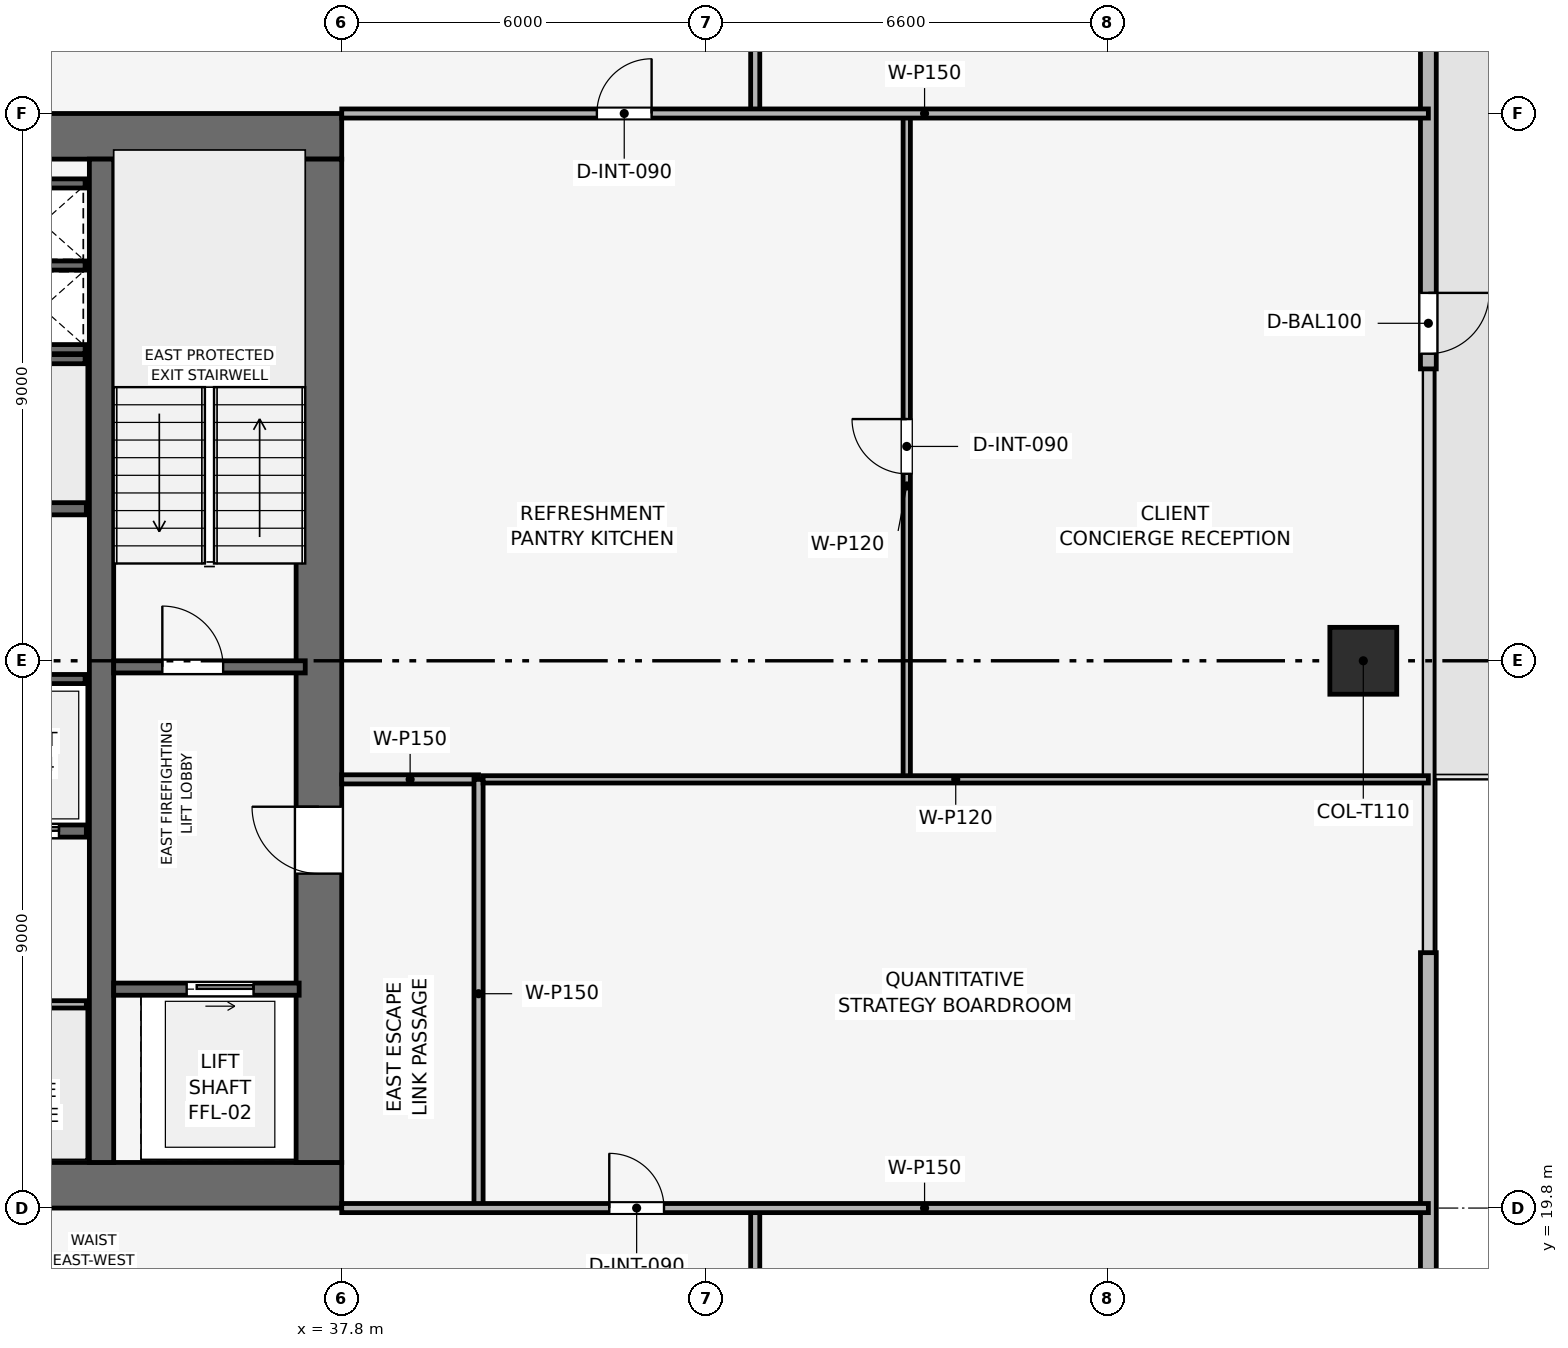
"""IFC4 building model, lengths in metres.
Left out: names, types, materials, properties, quantities, classifications, styles, units other than length and angle.
Written with IfcOpenShell. Run it as: python <this file> out.ifc"""

import sys

from ifc_helpers import new_model, si_unit, direction, frame, frame_2d, origin, origin_2d, place, context, subcontext, project, spatial, rectangle, extrude, element, fill, save


model = new_model("IFC4")
c1 = context("Model", 3, precision=1e-05, world=origin(), true_north=direction((0.0, 1.0)))
c2 = subcontext(c1, "Body", "Model", "MODEL_VIEW")
j1 = project(units=[si_unit("LENGTHUNIT", "METRE"), si_unit("PLANEANGLEUNIT", "RADIAN")], contexts=[c1])
p1 = place(None, origin())
s1 = spatial("IfcSite", under=j1, at=p1, CompositionType="ELEMENT")
p2 = place(p1, origin())
s2 = spatial("IfcBuilding", under=s1, at=p2, CompositionType="ELEMENT")
p3 = place(p2, frame((0.0, 0.0, 203.7)))
s3 = spatial("IfcBuildingStorey", under=s2, at=p3, CompositionType="ELEMENT", Elevation=203.7)
p4 = place(p3, frame((19.8, 20.175, 0.0), z_axis=(0.0, 0.0, 1.0), x_axis=(1.0, 0.0, 0.0)))
e1 = element("IfcWall", 1, at=p4, inside=s3, PredefinedType="SHEAR", context=c2, shape_type="SweptSolid", body=[
    extrude(rectangle(XDim=18.0, YDim=0.75, at=frame_2d((9.0, 0.0))), origin(), (0.0, 0.0, 1.0), 3.75),
])
p5 = place(p4, frame((8.4, 0.0, 0.0)))
e2 = element("IfcOpeningElement", 2, at=p5, cuts=e1, PredefinedType="OPENING", context=c2, shape_type="SweptSolid", body=[
    extrude(rectangle(XDim=1.2, YDim=2.2, at=frame_2d((0.6, 1.1))), frame((0.0, 0.385, 0.0), z_axis=(0.0, -1.0, 0.0), x_axis=(1.0, 0.0, 0.0)), (0.0, 0.0, 1.0), 0.77),
])
p6 = place(p3, frame((19.8, 37.425, 0.0), z_axis=(0.0, 0.0, 1.0), x_axis=(1.0, 0.0, 0.0)))
e3 = element("IfcWall", 3, at=p6, inside=s3, PredefinedType="SHEAR", context=c2, shape_type="SweptSolid", body=[
    extrude(rectangle(XDim=18.0, YDim=0.75, at=frame_2d((9.0, 0.0))), origin(), (0.0, 0.0, 1.0), 3.75),
])
p7 = place(p6, frame((7.05, 0.0, 0.0)))
e4 = element("IfcOpeningElement", 4, at=p7, cuts=e3, PredefinedType="OPENING", context=c2, shape_type="SweptSolid", body=[
    extrude(rectangle(XDim=1.1, YDim=2.15, at=frame_2d((0.55, 1.075))), frame((0.0, 0.385, 0.0), z_axis=(0.0, -1.0, 0.0), x_axis=(1.0, 0.0, 0.0)), (0.0, 0.0, 1.0), 0.77),
])
p8 = place(p3, frame((37.425, 20.55, 0.0), z_axis=(0.0, 0.0, 1.0), x_axis=(0.0, 1.0, 0.0)))
e5 = element("IfcWall", 5, at=p8, inside=s3, PredefinedType="SHEAR", context=c2, shape_type="SweptSolid", body=[
    extrude(rectangle(XDim=16.5, YDim=0.75, at=frame_2d((8.25, 0.0))), origin(), (0.0, 0.0, 1.0), 3.75),
])
p9 = place(p8, frame((4.75, 0.0, 0.0)))
e6 = element("IfcOpeningElement", 6, at=p9, cuts=e5, PredefinedType="OPENING", context=c2, shape_type="SweptSolid", body=[
    extrude(rectangle(XDim=1.1, YDim=2.15, at=frame_2d((0.55, 1.075))), frame((0.0, 0.385, 0.0), z_axis=(0.0, -1.0, 0.0), x_axis=(1.0, 0.0, 0.0)), (0.0, 0.0, 1.0), 0.77),
])
p10 = place(p3, frame((33.85, 20.55, 0.0), z_axis=(0.0, 0.0, 1.0), x_axis=(0.0, 1.0, 0.0)))
e7 = element("IfcWall", 7, at=p10, inside=s3, PredefinedType="SHEAR", context=c2, shape_type="SweptSolid", body=[
    extrude(rectangle(XDim=16.5, YDim=0.4, at=frame_2d((8.25, 0.0))), origin(), (0.0, 0.0, 1.0), 3.75),
])
p11 = place(p3, frame((54.6, 28.8, 0.003), z_axis=(0.0, 0.0, 1.0), x_axis=(1.0, 0.0, 0.0)))
e8 = element("IfcColumn", 8, at=p11, inside=s3, PredefinedType="COLUMN", context=c2, shape_type="SweptSolid", body=[
    extrude(rectangle(XDim=1.1, YDim=1.1, at=origin_2d()), origin(), (0.0, 0.0, 1.0), 3.494),
])
p12 = place(p3, frame((55.67, 48.3, 0.0), z_axis=(0.0, 0.0, 1.0), x_axis=(0.0, -1.0, 0.0)))
e9 = element("IfcWall", 9, at=p12, inside=s3, PredefinedType="SOLIDWALL", context=c2, shape_type="SweptSolid", body=[
    extrude(rectangle(XDim=14.7, YDim=0.26, at=frame_2d((7.35, 0.0))), origin(), (0.0, 0.0, 1.0), 3.5),
])
p13 = place(p12, frame((13.45, 0.0, 0.0)))
e10 = element("IfcOpeningElement", 10, at=p13, cuts=e9, PredefinedType="OPENING", context=c2, shape_type="SweptSolid", body=[
    extrude(rectangle(XDim=1.0, YDim=2.2, at=frame_2d((0.5, 1.1))), frame((0.0, 0.14, 0.0), z_axis=(0.0, -1.0, 0.0), x_axis=(1.0, 0.0, 0.0)), (0.0, 0.0, 1.0), 0.28),
])
p14 = place(p3, frame((55.67, 24.0, 0.0), z_axis=(0.0, 0.0, 1.0), x_axis=(0.0, -1.0, 0.0)))
e11 = element("IfcWall", 11, at=p14, inside=s3, PredefinedType="SOLIDWALL", context=c2, shape_type="SweptSolid", body=[
    extrude(rectangle(XDim=14.7, YDim=0.26, at=frame_2d((7.35, 0.0))), origin(), (0.0, 0.0, 1.0), 3.5),
])
p15 = place(p14, frame((10.65, 0.0, 0.9)))
e12 = element("IfcOpeningElement", 12, at=p15, cuts=e11, PredefinedType="OPENING", context=c2, shape_type="SweptSolid", body=[
    extrude(rectangle(XDim=3.8, YDim=1.9, at=frame_2d((1.9, 0.95))), frame((0.0, 0.14, 0.0), z_axis=(0.0, -1.0, 0.0), x_axis=(1.0, 0.0, 0.0)), (0.0, 0.0, 1.0), 0.28),
])
p16 = place(p3, frame((34.05, 28.7, 0.0), z_axis=(0.0, 0.0, 1.0), x_axis=(1.0, 0.0, 0.0)))
e13 = element("IfcWall", 13, at=p16, inside=s3, PredefinedType="SHEAR", context=c2, shape_type="SweptSolid", body=[
    extrude(rectangle(XDim=3.15, YDim=0.2, at=frame_2d((1.575, 0.0))), origin(), (0.0, 0.0, 1.0), 3.5),
])
p17 = place(p16, frame((0.8, 0.0, 0.0)))
e14 = element("IfcOpeningElement", 14, at=p17, cuts=e13, PredefinedType="OPENING", context=c2, shape_type="SweptSolid", body=[
    extrude(rectangle(XDim=1.0, YDim=2.1, at=frame_2d((0.5, 1.05))), frame((0.0, 0.11, 0.0), z_axis=(0.0, -1.0, 0.0), x_axis=(1.0, 0.0, 0.0)), (0.0, 0.0, 1.0), 0.22),
])
for number, where, z_axis, x_axis in (
    (15, (32.25, 33.925, 0.0), (0.0, 0.0, 1.0), (1.0, 0.0, 0.0)),
    (16, (32.25, 35.3, 0.0), (0.0, 0.0, 1.0), (1.0, 0.0, 0.0)),
):
    element("IfcWall", number, at=place(p3, frame(where, z_axis=z_axis, x_axis=x_axis)), inside=s3, PredefinedType="SHEAR", context=c2, shape_type="SweptSolid", body=[
        extrude(rectangle(XDim=1.33, YDim=0.15, at=frame_2d((0.665, 0.0))), origin(), (0.0, 0.0, 1.0), 3.5),
    ])
p18 = place(p3, frame((34.05, 23.4, 0.0), z_axis=(0.0, 0.0, 1.0), x_axis=(1.0, 0.0, 0.0)))
e17 = element("IfcWall", 17, at=p18, inside=s3, PredefinedType="SHEAR", context=c2, shape_type="SweptSolid", body=[
    extrude(rectangle(XDim=3.05, YDim=0.2, at=frame_2d((1.525, 0.0))), origin(), (0.0, 0.0, 1.0), 3.5),
])
p19 = place(p18, frame((1.2, 0.0, 0.0)))
e18 = element("IfcOpeningElement", 18, at=p19, cuts=e17, PredefinedType="OPENING", context=c2, shape_type="SweptSolid", body=[
    extrude(rectangle(XDim=1.1, YDim=2.15, at=frame_2d((0.55, 1.075))), frame((0.0, 0.11, 0.0), z_axis=(0.0, -1.0, 0.0), x_axis=(1.0, 0.0, 0.0)), (0.0, 0.0, 1.0), 0.22),
])
p20 = place(p3, frame((31.6, 26.0, 0.0), z_axis=(0.0, 0.0, 1.0), x_axis=(1.0, 0.0, 0.0)))
e19 = element("IfcWall", 19, at=p20, inside=s3, PredefinedType="SHEAR", context=c2, shape_type="SweptSolid", body=[
    extrude(rectangle(XDim=2.0, YDim=0.2, at=frame_2d((1.0, 0.0))), origin(), (0.0, 0.0, 1.0), 3.5),
])
p21 = place(p20, frame((0.45, 0.0, 0.0)))
e20 = element("IfcOpeningElement", 20, at=p21, cuts=e19, PredefinedType="OPENING", context=c2, shape_type="SweptSolid", body=[
    extrude(rectangle(XDim=1.1, YDim=2.15, at=frame_2d((0.55, 1.075))), frame((0.0, 0.11, 0.0), z_axis=(0.0, -1.0, 0.0), x_axis=(1.0, 0.0, 0.0)), (0.0, 0.0, 1.0), 0.22),
])
p22 = place(p3, frame((31.6, 31.3, 0.0), z_axis=(0.0, 0.0, 1.0), x_axis=(1.0, 0.0, 0.0)))
e21 = element("IfcWall", 21, at=p22, inside=s3, PredefinedType="SHEAR", context=c2, shape_type="SweptSolid", body=[
    extrude(rectangle(XDim=2.0, YDim=0.2, at=frame_2d((1.0, 0.0))), origin(), (0.0, 0.0, 1.0), 3.5),
])
p23 = place(p3, frame((32.25, 36.65, 0.0), z_axis=(0.0, 0.0, 1.0), x_axis=(1.0, 0.0, 0.0)))
e22 = element("IfcWall", 22, at=p23, inside=s3, PredefinedType="SHEAR", context=c2, shape_type="SweptSolid", body=[
    extrude(rectangle(XDim=1.33, YDim=0.15, at=frame_2d((0.665, 0.0))), origin(), (0.0, 0.0, 1.0), 3.5),
])
for number, where, z_axis, x_axis in (
    (23, (29.5, 28.5, 0.0), (0.0, 0.0, 1.0), (1.0, 0.0, 0.0)),
    (24, (29.5, 33.76, 0.0), (0.0, 0.0, 1.0), (1.0, 0.0, 0.0)),
):
    element("IfcWall", number, at=place(p3, frame(where, z_axis=z_axis, x_axis=x_axis)), inside=s3, PredefinedType="SHEAR", context=c2, shape_type="SweptSolid", body=[
        extrude(rectangle(XDim=4.08, YDim=0.15, at=frame_2d((2.04, 0.0))), origin(), (0.0, 0.0, 1.0), 3.5),
    ])
p24 = place(p3, frame((29.55, 23.15, 0.0), z_axis=(0.0, 0.0, 1.0), x_axis=(1.0, 0.0, 0.0)))
e25 = element("IfcWall", 25, at=p24, inside=s3, PredefinedType="PARTITIONING", context=c2, shape_type="SweptSolid", body=[
    extrude(rectangle(XDim=4.05, YDim=0.12, at=frame_2d((2.025, 0.0))), origin(), (0.0, 0.0, 1.0), 3.5),
])
p25 = place(p24, frame((1.575, 0.0, 0.0)))
e26 = element("IfcOpeningElement", 26, at=p25, cuts=e25, PredefinedType="OPENING", context=c2, shape_type="SweptSolid", body=[
    extrude(rectangle(XDim=0.9, YDim=2.1, at=frame_2d((0.45, 1.05))), frame((0.0, 0.07, 0.0), z_axis=(0.0, -1.0, 0.0), x_axis=(1.0, 0.0, 0.0)), (0.0, 0.0, 1.0), 0.14),
])
p26 = place(p3, frame((37.8, 26.85, 0.0), z_axis=(0.0, 0.0, 1.0), x_axis=(1.0, 0.0, 0.0)))
e27 = element("IfcWall", 27, at=p26, inside=s3, PredefinedType="PARTITIONING", context=c2, shape_type="SweptSolid", body=[
    extrude(rectangle(XDim=2.25, YDim=0.15, at=frame_2d((1.125, 0.0))), origin(), (0.0, 0.0, 1.0), 3.5),
])
p27 = place(p3, frame((40.05, 19.8, 0.0), z_axis=(0.0, 0.0, 1.0), x_axis=(0.0, 1.0, 0.0)))
e28 = element("IfcWall", 28, at=p27, inside=s3, PredefinedType="PARTITIONING", context=c2, shape_type="SweptSolid", body=[
    extrude(rectangle(XDim=7.05, YDim=0.15, at=frame_2d((3.525, 0.0))), origin(), (0.0, 0.0, 1.0), 3.035),
])
p28 = place(p3, frame((47.092, 26.85, 0.0), z_axis=(0.0, 0.0, 1.0), x_axis=(0.0, 1.0, 0.0)))
e29 = element("IfcWall", 29, at=p28, inside=s3, PredefinedType="PARTITIONING", context=c2, shape_type="SweptSolid", body=[
    extrude(rectangle(XDim=10.95, YDim=0.12, at=frame_2d((5.475, 0.0))), origin(), (0.0, 0.0, 1.0), 3.035),
])
p29 = place(p28, frame((5.025, 0.0, 0.0)))
e30 = element("IfcOpeningElement", 30, at=p29, cuts=e29, PredefinedType="OPENING", context=c2, shape_type="SweptSolid", body=[
    extrude(rectangle(XDim=0.9, YDim=2.1, at=frame_2d((0.45, 1.05))), frame((0.0, 0.07, 0.0), z_axis=(0.0, -1.0, 0.0), x_axis=(1.0, 0.0, 0.0)), (0.0, 0.0, 1.0), 0.14),
])
p30 = place(p3, frame((40.125, 26.85, 0.0), z_axis=(0.0, 0.0, 1.0), x_axis=(1.0, 0.0, 0.0)))
e31 = element("IfcWall", 31, at=p30, inside=s3, PredefinedType="PARTITIONING", context=c2, shape_type="SweptSolid", body=[
    extrude(rectangle(XDim=15.545, YDim=0.12, at=frame_2d((7.772, 0.0))), origin(), (0.0, 0.0, 1.0), 2.885),
])
p31 = place(p3, frame((44.6, 17.4, 0.0), z_axis=(0.0, 0.0, 1.0), x_axis=(0.0, 1.0, 0.0)))
e32 = element("IfcWall", 32, at=p31, inside=s3, PredefinedType="PARTITIONING", context=c2, shape_type="SweptSolid", body=[
    extrude(rectangle(XDim=2.4, YDim=0.15, at=frame_2d((1.2, 0.0))), origin(), (0.0, 0.0, 1.0), 3.5),
])
p32 = place(p3, frame((44.6, 37.8, 0.0), z_axis=(0.0, 0.0, 1.0), x_axis=(0.0, 1.0, 0.0)))
e33 = element("IfcWall", 33, at=p32, inside=s3, PredefinedType="PARTITIONING", context=c2, shape_type="SweptSolid", body=[
    extrude(rectangle(XDim=2.4, YDim=0.15, at=frame_2d((1.2, 0.0))), origin(), (0.0, 0.0, 1.0), 3.5),
])
p33 = place(p3, frame((37.8, 19.8, 0.0), z_axis=(0.0, 0.0, 1.0), x_axis=(1.0, 0.0, 0.0)))
e34 = element("IfcWall", 34, at=p33, inside=s3, PredefinedType="PARTITIONING", context=c2, shape_type="SweptSolid", body=[
    extrude(rectangle(XDim=17.87, YDim=0.15, at=frame_2d((8.935, 0.0))), origin(), (0.0, 0.0, 1.0), 2.885),
])
p34 = place(p33, frame((4.4, 0.0, 0.0)))
e35 = element("IfcOpeningElement", 35, at=p34, cuts=e34, PredefinedType="OPENING", context=c2, shape_type="SweptSolid", body=[
    extrude(rectangle(XDim=0.9, YDim=2.1, at=frame_2d((0.45, 1.05))), frame((0.0, 0.085, 0.0), z_axis=(0.0, -1.0, 0.0), x_axis=(1.0, 0.0, 0.0)), (0.0, 0.0, 1.0), 0.17),
])
p35 = place(p3, frame((37.8, 37.8, 0.0), z_axis=(0.0, 0.0, 1.0), x_axis=(1.0, 0.0, 0.0)))
e36 = element("IfcWall", 36, at=p35, inside=s3, PredefinedType="PARTITIONING", context=c2, shape_type="SweptSolid", body=[
    extrude(rectangle(XDim=17.87, YDim=0.15, at=frame_2d((8.935, 0.0))), origin(), (0.0, 0.0, 1.0), 2.885),
])
p36 = place(p35, frame((4.196, 0.0, 0.0)))
e37 = element("IfcOpeningElement", 37, at=p36, cuts=e36, PredefinedType="OPENING", context=c2, shape_type="SweptSolid", body=[
    extrude(rectangle(XDim=0.9, YDim=2.1, at=frame_2d((0.45, 1.05))), frame((0.0, 0.085, 0.0), z_axis=(0.0, -1.0, 0.0), x_axis=(1.0, 0.0, 0.0)), (0.0, 0.0, 1.0), 0.17),
])
p37 = place(p13, origin())
e38 = element("IfcDoor", 38, at=p37, inside=s3, OperationType="SINGLE_SWING_LEFT", PredefinedType="DOOR", context=c2, shape_type="SweptSolid", body=[
    extrude(rectangle(XDim=1.0, YDim=2.2, at=frame_2d((0.5, 1.1))), frame((0.0, 0.025, 0.0), z_axis=(0.0, -1.0, 0.0), x_axis=(1.0, 0.0, 0.0)), (0.0, 0.0, 1.0), 0.05),
])
fill(e10, e38)
p38 = place(p17, origin())
e39 = element("IfcDoor", 39, at=p38, inside=s3, OperationType="SINGLE_SWING_LEFT", PredefinedType="DOOR", context=c2, shape_type="SweptSolid", body=[
    extrude(rectangle(XDim=1.0, YDim=2.1, at=frame_2d((0.5, 1.05))), frame((0.0, 0.025, 0.0), z_axis=(0.0, -1.0, 0.0), x_axis=(1.0, 0.0, 0.0)), (0.0, 0.0, 1.0), 0.05),
])
fill(e14, e39)
p39 = place(p19, origin())
e40 = element("IfcDoor", 40, at=p39, inside=s3, OperationType="SLIDING_TO_RIGHT", PredefinedType="DOOR", context=c2, shape_type="SweptSolid", body=[
    extrude(rectangle(XDim=1.1, YDim=2.15, at=frame_2d((0.55, 1.075))), frame((0.0, 0.025, 0.0), z_axis=(0.0, -1.0, 0.0), x_axis=(1.0, 0.0, 0.0)), (0.0, 0.0, 1.0), 0.05),
])
fill(e18, e40)
p40 = place(p21, origin())
e41 = element("IfcDoor", 41, at=p40, inside=s3, OperationType="SLIDING_TO_RIGHT", PredefinedType="DOOR", context=c2, shape_type="SweptSolid", body=[
    extrude(rectangle(XDim=1.1, YDim=2.15, at=frame_2d((0.55, 1.075))), frame((0.0, 0.025, 0.0), z_axis=(0.0, -1.0, 0.0), x_axis=(1.0, 0.0, 0.0)), (0.0, 0.0, 1.0), 0.05),
])
fill(e20, e41)
p41 = place(p29, origin())
e42 = element("IfcDoor", 42, at=p41, inside=s3, OperationType="SINGLE_SWING_RIGHT", PredefinedType="DOOR", context=c2, shape_type="SweptSolid", body=[
    extrude(rectangle(XDim=0.9, YDim=2.1, at=frame_2d((0.45, 1.05))), frame((0.0, 0.025, 0.0), z_axis=(0.0, -1.0, 0.0), x_axis=(1.0, 0.0, 0.0)), (0.0, 0.0, 1.0), 0.05),
])
fill(e30, e42)
p42 = place(p34, origin())
e43 = element("IfcDoor", 43, at=p42, inside=s3, OperationType="SINGLE_SWING_LEFT", PredefinedType="DOOR", context=c2, shape_type="SweptSolid", body=[
    extrude(rectangle(XDim=0.9, YDim=2.1, at=frame_2d((0.45, 1.05))), frame((0.0, 0.025, 0.0), z_axis=(0.0, -1.0, 0.0), x_axis=(1.0, 0.0, 0.0)), (0.0, 0.0, 1.0), 0.05),
])
fill(e35, e43)
p43 = place(p36, origin())
e44 = element("IfcDoor", 44, at=p43, inside=s3, OperationType="SINGLE_SWING_RIGHT", PredefinedType="DOOR", context=c2, shape_type="SweptSolid", body=[
    extrude(rectangle(XDim=0.9, YDim=2.1, at=frame_2d((0.45, 1.05))), frame((0.0, 0.025, 0.0), z_axis=(0.0, -1.0, 0.0), x_axis=(1.0, 0.0, 0.0)), (0.0, 0.0, 1.0), 0.05),
])
fill(e37, e44)
p44 = place(p9, origin())
e45 = element("IfcDoor", 45, at=p44, inside=s3, OperationType="SINGLE_SWING_RIGHT", PredefinedType="DOOR", context=c2, shape_type="SweptSolid", body=[
    extrude(rectangle(XDim=1.1, YDim=2.15, at=frame_2d((0.55, 1.075))), frame((0.0, 0.025, 0.0), z_axis=(0.0, -1.0, 0.0), x_axis=(1.0, 0.0, 0.0)), (0.0, 0.0, 1.0), 0.05),
])
fill(e6, e45)
save(model, sys.argv[1])
